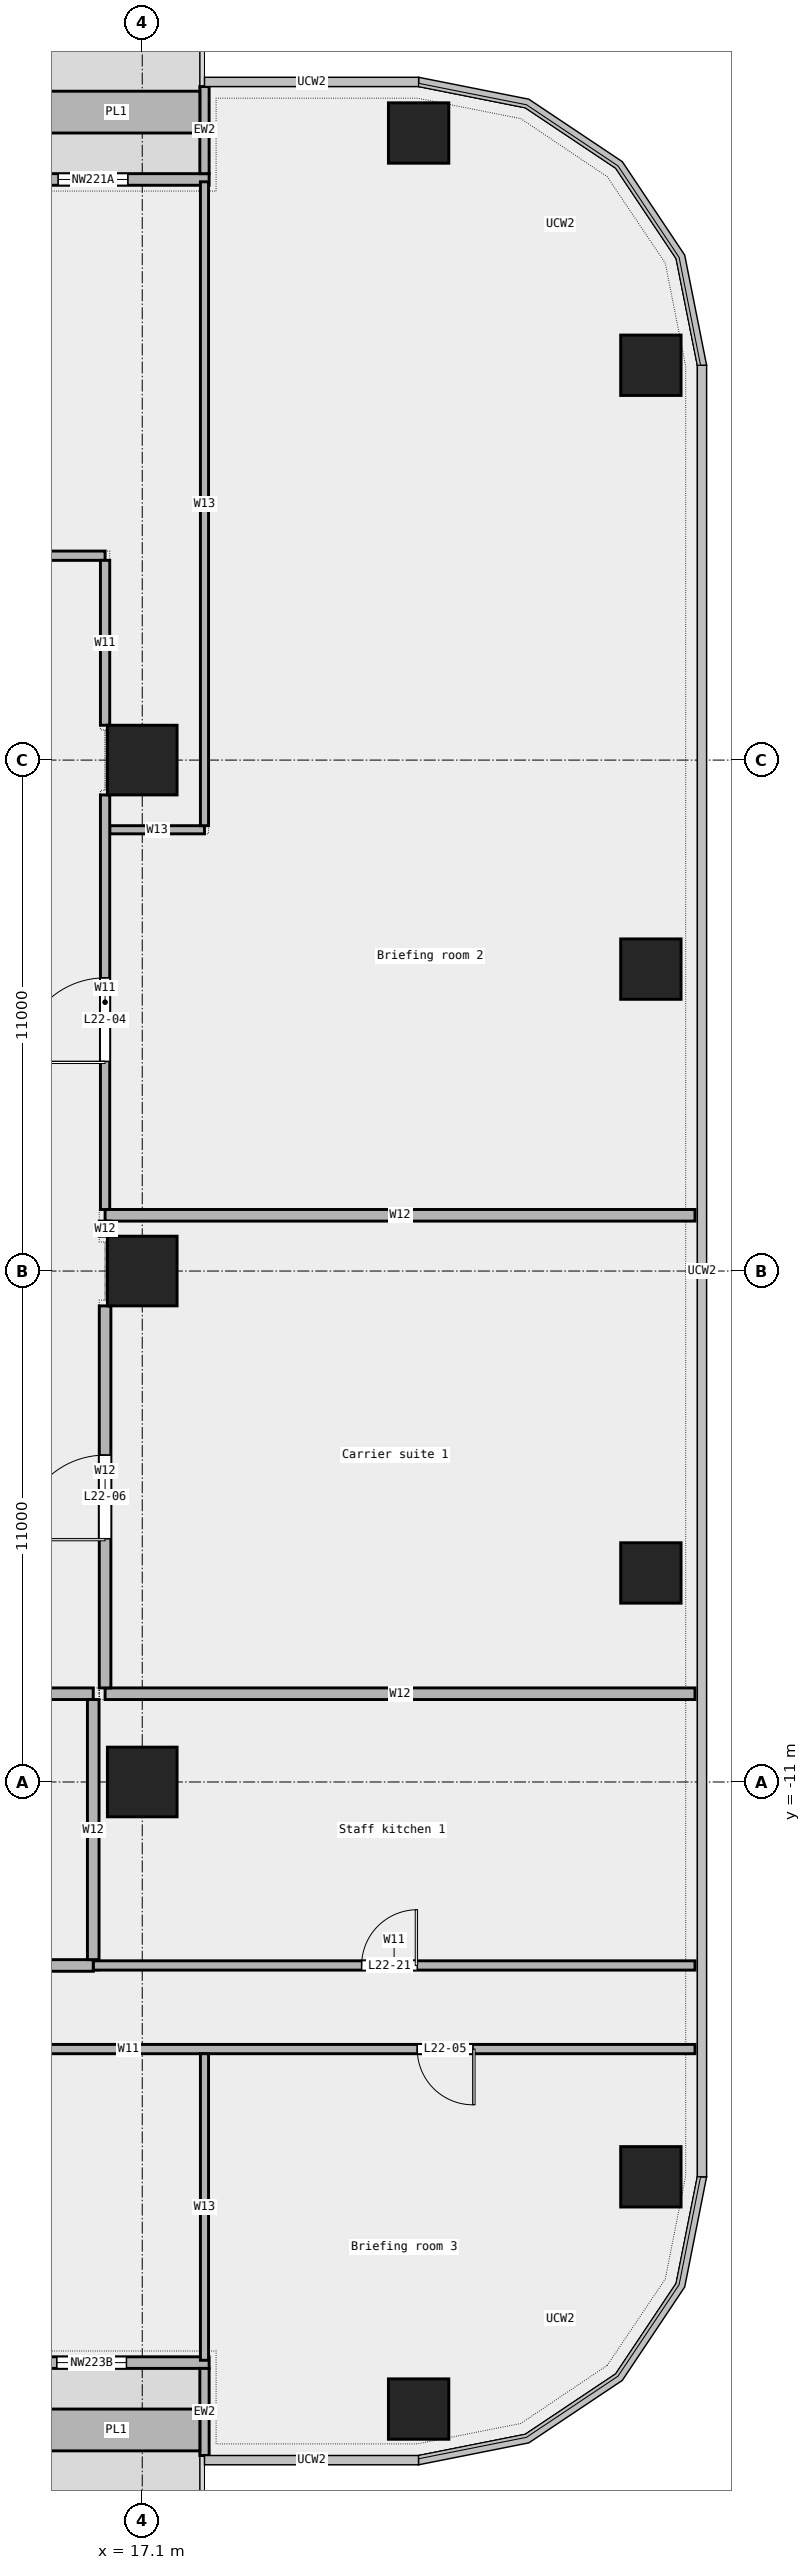
"""IFC4 building model, lengths in metres.
Left out: names, types, materials, properties, quantities, classifications, styles, units other than length and angle.
Written with IfcOpenShell. Run it as: python <this file> out.ifc"""

import sys

from ifc_helpers import new_model, si_unit, direction, frame, frame_2d, origin, origin_2d, place, context, subcontext, project, spatial, rectangle, extrude, element, fill, save


model = new_model("IFC4")
c1 = context("Model", 3, precision=1e-05, world=origin(), true_north=direction((0.0, 1.0)))
c2 = subcontext(c1, "Body", "Model", "MODEL_VIEW")
j1 = project(units=[si_unit("LENGTHUNIT", "METRE"), si_unit("PLANEANGLEUNIT", "RADIAN")], contexts=[c1])
p1 = place(None, origin())
s1 = spatial("IfcSite", under=j1, at=p1, CompositionType="ELEMENT")
p2 = place(p1, origin())
s2 = spatial("IfcBuilding", under=s1, at=p2, CompositionType="ELEMENT")
p3 = place(p2, frame((0.0, 0.0, 112.6)))
s3 = spatial("IfcBuildingStorey", under=s2, at=p3, CompositionType="ELEMENT", Elevation=112.6)
for number, where, z_axis, x_axis in (
    (1, (23.05, -24.5, 0.0), (0.0, 0.0, 1.0), (1.0, 0.0, 0.0)),
    (2, (28.05, -19.5, 0.0), (0.0, 0.0, 1.0), (1.0, 0.0, 0.0)),
    (3, (28.05, -6.5, 0.0), (0.0, 0.0, 1.0), (1.0, 0.0, 0.0)),
    (4, (28.05, 6.5, 0.0), (0.0, 0.0, 1.0), (1.0, 0.0, 0.0)),
    (5, (28.05, 19.5, 0.0), (0.0, 0.0, 1.0), (1.0, 0.0, 0.0)),
    (6, (23.05, 24.5, 0.0), (0.0, 0.0, 1.0), (1.0, 0.0, 0.0)),
):
    element("IfcColumn", number, at=place(p3, frame(where, z_axis=z_axis, x_axis=x_axis)), inside=s3, PredefinedType="COLUMN", context=c2, shape_type="SweptSolid", body=[
        extrude(rectangle(XDim=1.3, YDim=1.3, at=origin_2d()), origin(), (0.0, 0.0, 1.0), 4.05),
    ])
for number, where, z_axis, x_axis in (
    (7, (17.1, -11.0, 0.0), (0.0, 0.0, 1.0), (1.0, 0.0, 0.0)),
    (8, (17.1, 0.0, 0.0), (0.0, 0.0, 1.0), (1.0, 0.0, 0.0)),
    (9, (17.1, 11.0, 0.0), (0.0, 0.0, 1.0), (1.0, 0.0, 0.0)),
):
    element("IfcColumn", number, at=place(p3, frame(where, z_axis=z_axis, x_axis=x_axis)), inside=s3, PredefinedType="COLUMN", context=c2, shape_type="SweptSolid", body=[
        extrude(rectangle(XDim=1.5, YDim=1.5, at=origin_2d()), origin(), (0.0, 0.0, 1.0), 4.05),
    ])
p4 = place(p3, frame((18.54, 23.5, 0.0), z_axis=(0.0, 0.0, 1.0), x_axis=(-1.0, 0.0, 0.0)))
e10 = element("IfcWall", 10, at=p4, inside=s3, PredefinedType="STANDARD", context=c2, shape_type="SweptSolid", body=[
    extrude(rectangle(XDim=14.03, YDim=0.25, at=frame_2d((7.015, 0.0))), origin(), (0.0, 0.0, 1.0), 4.05),
])
p5 = place(p4, frame((1.75, 0.0, 0.45)))
e11 = element("IfcOpeningElement", 11, at=p5, cuts=e10, PredefinedType="OPENING", context=c2, shape_type="SweptSolid", body=[
    extrude(rectangle(XDim=1.5, YDim=3.0, at=frame_2d((0.75, 1.5))), frame((0.0, 0.137, 0.0), z_axis=(0.0, -1.0, 0.0), x_axis=(1.0, 0.0, 0.0)), (0.0, 0.0, 1.0), 0.274),
])
p6 = place(p4, frame((4.25, 0.0, 0.0)))
e12 = element("IfcOpeningElement", 12, at=p6, cuts=e10, PredefinedType="OPENING", context=c2, shape_type="SweptSolid", body=[
    extrude(rectangle(XDim=1.8, YDim=2.4, at=frame_2d((0.9, 1.2))), frame((0.0, 0.137, 0.0), z_axis=(0.0, -1.0, 0.0), x_axis=(1.0, 0.0, 0.0)), (0.0, 0.0, 1.0), 0.274),
])
p7 = place(p4, frame((10.75, 0.0, 0.45)))
e13 = element("IfcOpeningElement", 13, at=p7, cuts=e10, PredefinedType="OPENING", context=c2, shape_type="SweptSolid", body=[
    extrude(rectangle(XDim=1.5, YDim=3.0, at=frame_2d((0.75, 1.5))), frame((0.0, 0.137, 0.0), z_axis=(0.0, -1.0, 0.0), x_axis=(1.0, 0.0, 0.0)), (0.0, 0.0, 1.0), 0.274),
])
p8 = place(p3, frame((18.44, 25.5, 0.0), z_axis=(0.0, 0.0, 1.0), x_axis=(0.0, -1.0, 0.0)))
e14 = element("IfcWall", 14, at=p8, inside=s3, PredefinedType="STANDARD", context=c2, shape_type="SweptSolid", body=[
    extrude(rectangle(XDim=1.875, YDim=0.2, at=frame_2d((0.938, 0.0))), origin(), (0.0, 0.0, 1.0), 4.05),
])
p9 = place(p3, frame((18.34, 24.95, 0.0), z_axis=(0.0, 0.0, 1.0), x_axis=(-1.0, 0.0, 0.0)))
e15 = element("IfcWall", 15, at=p9, inside=s3, PredefinedType="STANDARD", context=c2, shape_type="SweptSolid", body=[
    extrude(rectangle(XDim=3.6, YDim=0.9, at=frame_2d((1.8, 0.0))), origin(), (0.0, 0.0, 1.0), 0.7),
])
p10 = place(p3, frame((4.51, -23.5, 0.0), z_axis=(0.0, 0.0, 1.0), x_axis=(1.0, 0.0, 0.0)))
e16 = element("IfcWall", 16, at=p10, inside=s3, PredefinedType="STANDARD", context=c2, shape_type="SweptSolid", body=[
    extrude(rectangle(XDim=14.03, YDim=0.25, at=frame_2d((7.015, 0.0))), origin(), (0.0, 0.0, 1.0), 4.05),
])
p11 = place(p10, frame((1.75, 0.0, 0.45)))
e17 = element("IfcOpeningElement", 17, at=p11, cuts=e16, PredefinedType="OPENING", context=c2, shape_type="SweptSolid", body=[
    extrude(rectangle(XDim=1.5, YDim=3.0, at=frame_2d((0.75, 1.5))), frame((0.0, 0.137, 0.0), z_axis=(0.0, -1.0, 0.0), x_axis=(1.0, 0.0, 0.0)), (0.0, 0.0, 1.0), 0.274),
])
p12 = place(p10, frame((4.25, 0.0, 0.0)))
e18 = element("IfcOpeningElement", 18, at=p12, cuts=e16, PredefinedType="OPENING", context=c2, shape_type="SweptSolid", body=[
    extrude(rectangle(XDim=1.8, YDim=2.4, at=frame_2d((0.9, 1.2))), frame((0.0, 0.137, 0.0), z_axis=(0.0, -1.0, 0.0), x_axis=(1.0, 0.0, 0.0)), (0.0, 0.0, 1.0), 0.274),
])
p13 = place(p10, frame((10.75, 0.0, 0.45)))
e19 = element("IfcOpeningElement", 19, at=p13, cuts=e16, PredefinedType="OPENING", context=c2, shape_type="SweptSolid", body=[
    extrude(rectangle(XDim=1.5, YDim=3.0, at=frame_2d((0.75, 1.5))), frame((0.0, 0.137, 0.0), z_axis=(0.0, -1.0, 0.0), x_axis=(1.0, 0.0, 0.0)), (0.0, 0.0, 1.0), 0.274),
])
p14 = place(p3, frame((18.44, -25.5, 0.0), z_axis=(0.0, 0.0, 1.0), x_axis=(0.0, 1.0, 0.0)))
e20 = element("IfcWall", 20, at=p14, inside=s3, PredefinedType="STANDARD", context=c2, shape_type="SweptSolid", body=[
    extrude(rectangle(XDim=1.875, YDim=0.2, at=frame_2d((0.938, 0.0))), origin(), (0.0, 0.0, 1.0), 4.05),
])
p15 = place(p3, frame((14.74, -24.95, 0.0), z_axis=(0.0, 0.0, 1.0), x_axis=(1.0, 0.0, 0.0)))
e21 = element("IfcWall", 21, at=p15, inside=s3, PredefinedType="STANDARD", context=c2, shape_type="SweptSolid", body=[
    extrude(rectangle(XDim=3.6, YDim=0.9, at=frame_2d((1.8, 0.0))), origin(), (0.0, 0.0, 1.0), 0.7),
])
p16 = place(p3, frame((4.61, -16.75, 0.0), z_axis=(0.0, 0.0, 1.0), x_axis=(1.0, 0.0, 0.0)))
e22 = element("IfcWall", 22, at=p16, inside=s3, PredefinedType="PARTITIONING", context=c2, shape_type="SweptSolid", body=[
    extrude(rectangle(XDim=24.39, YDim=0.2, at=frame_2d((12.195, 0.0))), origin(), (0.0, 0.0, 1.0), 4.05),
])
p17 = place(p16, frame((18.41, 0.0, 0.0)))
e23 = element("IfcOpeningElement", 23, at=p17, cuts=e22, PredefinedType="OPENING", context=c2, shape_type="SweptSolid", body=[
    extrude(rectangle(XDim=1.2, YDim=2.1, at=frame_2d((0.6, 1.05))), frame((0.0, 0.112, 0.0), z_axis=(0.0, -1.0, 0.0), x_axis=(1.0, 0.0, 0.0)), (0.0, 0.0, 1.0), 0.224),
])
p18 = place(p16, frame((6.315, 0.0, 0.0)))
e24 = element("IfcOpeningElement", 24, at=p18, cuts=e22, PredefinedType="OPENING", context=c2, shape_type="SweptSolid", body=[
    extrude(rectangle(XDim=1.2, YDim=2.1, at=frame_2d((0.6, 1.05))), frame((0.0, 0.112, 0.0), z_axis=(0.0, -1.0, 0.0), x_axis=(1.0, 0.0, 0.0)), (0.0, 0.0, 1.0), 0.224),
])
p19 = place(p3, frame((16.045, -14.95, 0.0), z_axis=(0.0, 0.0, 1.0), x_axis=(1.0, 0.0, 0.0)))
e25 = element("IfcWall", 25, at=p19, inside=s3, PredefinedType="PARTITIONING", context=c2, shape_type="SweptSolid", body=[
    extrude(rectangle(XDim=12.955, YDim=0.2, at=frame_2d((6.478, 0.0))), origin(), (0.0, 0.0, 1.0), 4.05),
])
p20 = place(p19, frame((5.778, 0.0, 0.0)))
e26 = element("IfcOpeningElement", 26, at=p20, cuts=e25, PredefinedType="OPENING", context=c2, shape_type="SweptSolid", body=[
    extrude(rectangle(XDim=1.2, YDim=2.1, at=frame_2d((0.6, 1.05))), frame((0.0, 0.112, 0.0), z_axis=(0.0, -1.0, 0.0), x_axis=(1.0, 0.0, 0.0)), (0.0, 0.0, 1.0), 0.224),
])
p21 = place(p3, frame((8.39, -14.95, 0.0), z_axis=(0.0, 0.0, 1.0), x_axis=(1.0, 0.0, 0.0)))
e27 = element("IfcWall", 27, at=p21, inside=s3, PredefinedType="PARTITIONING", context=c2, shape_type="SweptSolid", body=[
    extrude(rectangle(XDim=7.655, YDim=0.25, at=frame_2d((3.828, 0.0))), origin(), (0.0, 0.0, 1.0), 4.05),
])
p22 = place(p3, frame((8.39, -9.1, 0.0), z_axis=(0.0, 0.0, 1.0), x_axis=(1.0, 0.0, 0.0)))
e28 = element("IfcWall", 28, at=p22, inside=s3, PredefinedType="PARTITIONING", context=c2, shape_type="SweptSolid", body=[
    extrude(rectangle(XDim=7.655, YDim=0.25, at=frame_2d((3.828, 0.0))), origin(), (0.0, 0.0, 1.0), 4.05),
])
p23 = place(p22, frame((3.377, 0.0, 0.0)))
e29 = element("IfcOpeningElement", 29, at=p23, cuts=e28, PredefinedType="OPENING", context=c2, shape_type="SweptSolid", body=[
    extrude(rectangle(XDim=0.9, YDim=2.1, at=frame_2d((0.45, 1.05))), frame((0.0, 0.137, 0.0), z_axis=(0.0, -1.0, 0.0), x_axis=(1.0, 0.0, 0.0)), (0.0, 0.0, 1.0), 0.274),
])
for number, where, z_axis, x_axis in (
    (30, (16.3, -9.1, 0.0), (0.0, 0.0, 1.0), (1.0, 0.0, 0.0)),
    (31, (16.3, 1.2, 0.0), (0.0, 0.0, 1.0), (1.0, 0.0, 0.0)),
):
    element("IfcWall", number, at=place(p3, frame(where, z_axis=z_axis, x_axis=x_axis)), inside=s3, PredefinedType="PARTITIONING", context=c2, shape_type="SweptSolid", body=[
        extrude(rectangle(XDim=12.7, YDim=0.25, at=frame_2d((6.35, 0.0))), origin(), (0.0, 0.0, 1.0), 4.05),
    ])
p24 = place(p3, frame((16.4, 9.5, 0.0), z_axis=(0.0, 0.0, 1.0), x_axis=(1.0, 0.0, 0.0)))
e32 = element("IfcWall", 32, at=p24, inside=s3, PredefinedType="PARTITIONING", context=c2, shape_type="SweptSolid", body=[
    extrude(rectangle(XDim=2.04, YDim=0.175, at=frame_2d((1.02, 0.0))), origin(), (0.0, 0.0, 1.0), 4.05),
])
p25 = place(p3, frame((4.61, 15.4, 0.0), z_axis=(0.0, 0.0, 1.0), x_axis=(1.0, 0.0, 0.0)))
e33 = element("IfcWall", 33, at=p25, inside=s3, PredefinedType="PARTITIONING", context=c2, shape_type="SweptSolid", body=[
    extrude(rectangle(XDim=11.69, YDim=0.2, at=frame_2d((5.845, 0.0))), origin(), (0.0, 0.0, 1.0), 4.05),
])
p26 = place(p25, frame((5.095, 0.0, 0.0)))
e34 = element("IfcOpeningElement", 34, at=p26, cuts=e33, PredefinedType="OPENING", context=c2, shape_type="SweptSolid", body=[
    extrude(rectangle(XDim=1.5, YDim=2.1, at=frame_2d((0.75, 1.05))), frame((0.0, 0.112, 0.0), z_axis=(0.0, -1.0, 0.0), x_axis=(1.0, 0.0, 0.0)), (0.0, 0.0, 1.0), 0.224),
])
p27 = place(p3, frame((16.045, -14.825, 0.0), z_axis=(0.0, 0.0, 1.0), x_axis=(0.0, 1.0, 0.0)))
e35 = element("IfcWall", 35, at=p27, inside=s3, PredefinedType="PARTITIONING", context=c2, shape_type="SweptSolid", body=[
    extrude(rectangle(XDim=5.6, YDim=0.25, at=frame_2d((2.8, 0.0))), origin(), (0.0, 0.0, 1.0), 4.05),
])
p28 = place(p3, frame((16.3, 1.325, 0.0), z_axis=(0.0, 0.0, 1.0), x_axis=(0.0, 1.0, 0.0)))
e36 = element("IfcWall", 36, at=p28, inside=s3, PredefinedType="PARTITIONING", context=c2, shape_type="SweptSolid", body=[
    extrude(rectangle(XDim=8.925, YDim=0.2, at=frame_2d((4.462, 0.0))), origin(), (0.0, 0.0, 1.0), 4.05),
])
p29 = place(p28, frame((3.188, 0.0, 0.0)))
e37 = element("IfcOpeningElement", 37, at=p29, cuts=e36, PredefinedType="OPENING", context=c2, shape_type="SweptSolid", body=[
    extrude(rectangle(XDim=1.8, YDim=2.1, at=frame_2d((0.9, 1.05))), frame((0.0, 0.112, 0.0), z_axis=(0.0, -1.0, 0.0), x_axis=(1.0, 0.0, 0.0)), (0.0, 0.0, 1.0), 0.224),
])
p30 = place(p3, frame((16.3, 11.75, 0.0), z_axis=(0.0, 0.0, 1.0), x_axis=(0.0, 1.0, 0.0)))
e38 = element("IfcWall", 38, at=p30, inside=s3, PredefinedType="PARTITIONING", context=c2, shape_type="SweptSolid", body=[
    extrude(rectangle(XDim=3.55, YDim=0.2, at=frame_2d((1.775, 0.0))), origin(), (0.0, 0.0, 1.0), 4.05),
])
p31 = place(p3, frame((16.3, -8.975, 0.0), z_axis=(0.0, 0.0, 1.0), x_axis=(0.0, 1.0, 0.0)))
e39 = element("IfcWall", 39, at=p31, inside=s3, PredefinedType="PARTITIONING", context=c2, shape_type="SweptSolid", body=[
    extrude(rectangle(XDim=8.225, YDim=0.25, at=frame_2d((4.113, 0.0))), origin(), (0.0, 0.0, 1.0), 4.05),
])
p32 = place(p31, frame((3.212, 0.0, 0.0)))
e40 = element("IfcOpeningElement", 40, at=p32, cuts=e39, PredefinedType="OPENING", context=c2, shape_type="SweptSolid", body=[
    extrude(rectangle(XDim=1.8, YDim=2.1, at=frame_2d((0.9, 1.05))), frame((0.0, 0.137, 0.0), z_axis=(0.0, -1.0, 0.0), x_axis=(1.0, 0.0, 0.0)), (0.0, 0.0, 1.0), 0.274),
])
p33 = place(p3, frame((16.3, 0.75, 0.0), z_axis=(0.0, 0.0, 1.0), x_axis=(0.0, 1.0, 0.0)))
e41 = element("IfcWall", 41, at=p33, inside=s3, PredefinedType="PARTITIONING", context=c2, shape_type="SweptSolid", body=[
    extrude(rectangle(XDim=0.325, YDim=0.25, at=frame_2d((0.163, 0.0))), origin(), (0.0, 0.0, 1.0), 4.05),
])
p34 = place(p3, frame((18.44, -23.45, 0.0), z_axis=(0.0, 0.0, 1.0), x_axis=(0.0, 1.0, 0.0)))
e42 = element("IfcWall", 42, at=p34, inside=s3, PredefinedType="PARTITIONING", context=c2, shape_type="SweptSolid", body=[
    extrude(rectangle(XDim=6.6, YDim=0.175, at=frame_2d((3.3, 0.0))), origin(), (0.0, 0.0, 1.0), 4.05),
])
p35 = place(p3, frame((18.44, 9.588, 0.0), z_axis=(0.0, 0.0, 1.0), x_axis=(0.0, 1.0, 0.0)))
e43 = element("IfcWall", 43, at=p35, inside=s3, PredefinedType="PARTITIONING", context=c2, shape_type="SweptSolid", body=[
    extrude(rectangle(XDim=13.862, YDim=0.175, at=frame_2d((6.931, 0.0))), origin(), (0.0, 0.0, 1.0), 4.05),
])
p36 = place(p5, origin())
e44 = element("IfcWindow", 44, at=p36, inside=s3, PartitioningType="SINGLE_PANEL", PredefinedType="WINDOW", context=c2, shape_type="SweptSolid", body=[
    extrude(rectangle(XDim=1.5, YDim=3.0, at=frame_2d((0.75, 1.5))), frame((0.0, 0.03, 0.0), z_axis=(0.0, -1.0, 0.0), x_axis=(1.0, 0.0, 0.0)), (0.0, 0.0, 1.0), 0.06),
])
fill(e11, e44)
p37 = place(p13, origin())
e45 = element("IfcWindow", 45, at=p37, inside=s3, PartitioningType="SINGLE_PANEL", PredefinedType="WINDOW", context=c2, shape_type="SweptSolid", body=[
    extrude(rectangle(XDim=1.5, YDim=3.0, at=frame_2d((0.75, 1.5))), frame((0.0, 0.03, 0.0), z_axis=(0.0, -1.0, 0.0), x_axis=(1.0, 0.0, 0.0)), (0.0, 0.0, 1.0), 0.06),
])
fill(e19, e45)
p38 = place(p29, origin())
e46 = element("IfcDoor", 46, at=p38, inside=s3, OperationType="DOUBLE_DOOR_SINGLE_SWING", PredefinedType="DOOR", context=c2, shape_type="SweptSolid", body=[
    extrude(rectangle(XDim=1.8, YDim=2.1, at=frame_2d((0.9, 1.05))), frame((0.0, 0.025, 0.0), z_axis=(0.0, -1.0, 0.0), x_axis=(1.0, 0.0, 0.0)), (0.0, 0.0, 1.0), 0.05),
])
fill(e37, e46)
p39 = place(p17, origin())
e47 = element("IfcDoor", 47, at=p39, inside=s3, OperationType="SINGLE_SWING_LEFT", PredefinedType="DOOR", context=c2, shape_type="SweptSolid", body=[
    extrude(rectangle(XDim=1.2, YDim=2.1, at=frame_2d((0.6, 1.05))), frame((0.0, 0.025, 0.0), z_axis=(0.0, -1.0, 0.0), x_axis=(1.0, 0.0, 0.0)), (0.0, 0.0, 1.0), 0.05),
])
fill(e23, e47)
p40 = place(p32, origin())
e48 = element("IfcDoor", 48, at=p40, inside=s3, OperationType="DOUBLE_DOOR_SINGLE_SWING", PredefinedType="DOOR", context=c2, shape_type="SweptSolid", body=[
    extrude(rectangle(XDim=1.8, YDim=2.1, at=frame_2d((0.9, 1.05))), frame((0.0, 0.025, 0.0), z_axis=(0.0, -1.0, 0.0), x_axis=(1.0, 0.0, 0.0)), (0.0, 0.0, 1.0), 0.05),
])
fill(e40, e48)
p41 = place(p20, origin())
e49 = element("IfcDoor", 49, at=p41, inside=s3, OperationType="SINGLE_SWING_RIGHT", PredefinedType="DOOR", context=c2, shape_type="SweptSolid", body=[
    extrude(rectangle(XDim=1.2, YDim=2.1, at=frame_2d((0.6, 1.05))), frame((0.0, 0.025, 0.0), z_axis=(0.0, -1.0, 0.0), x_axis=(1.0, 0.0, 0.0)), (0.0, 0.0, 1.0), 0.05),
])
fill(e26, e49)
save(model, sys.argv[1])
